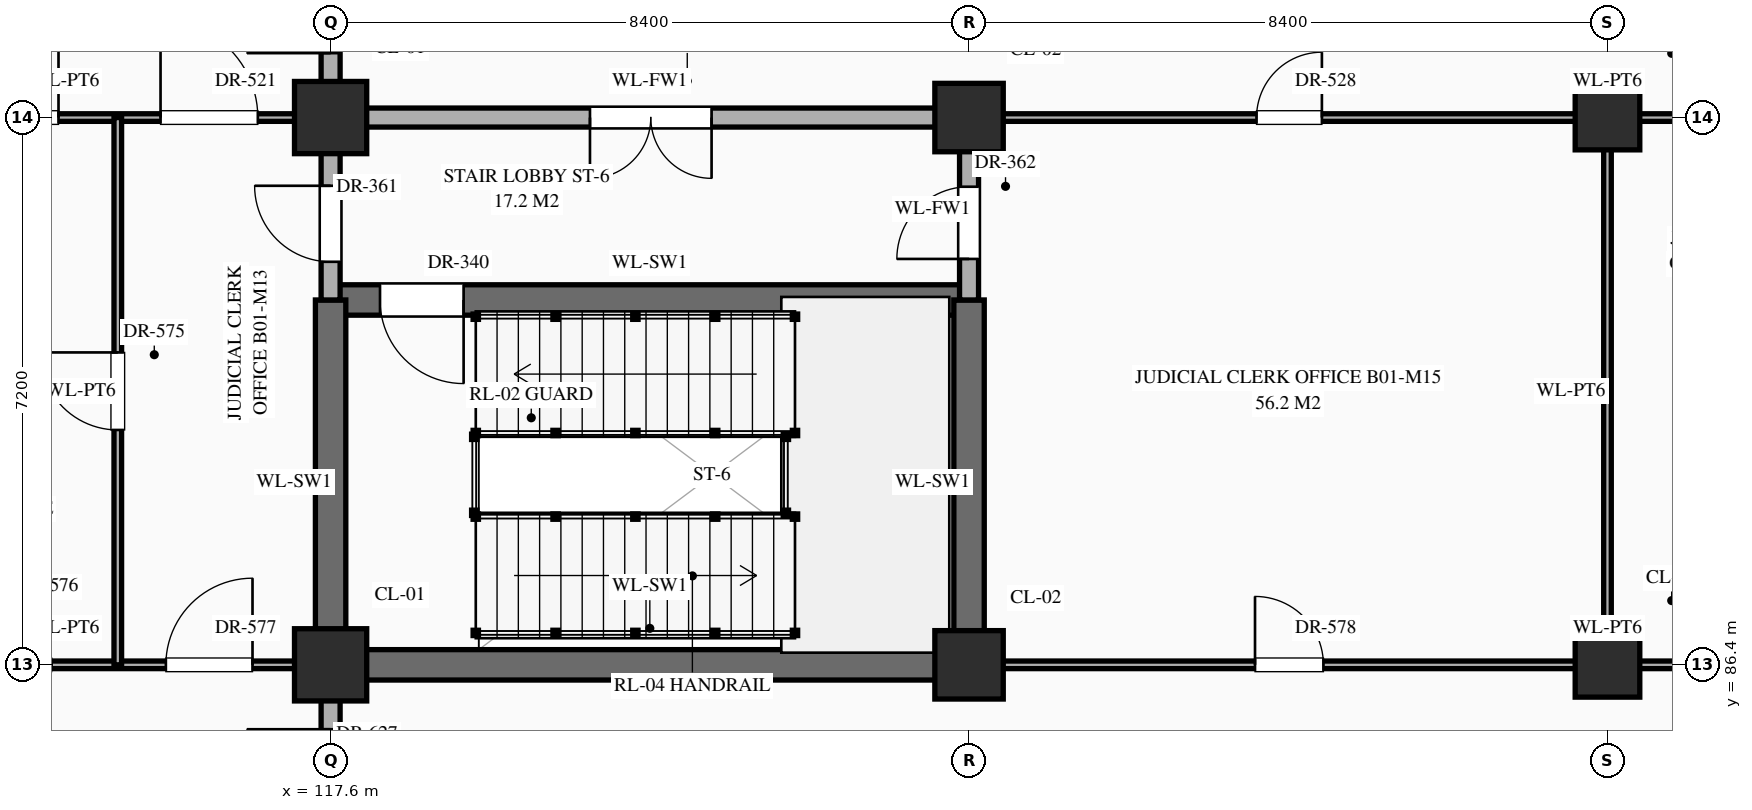
"""IFC4 building model, lengths in metres.
Left out: names, types, materials, properties, quantities, classifications, styles, units other than length and angle.
Written with IfcOpenShell. Run it as: python <this file> out.ifc"""

import sys

from ifc_helpers import new_model, si_unit, direction, frame, frame_2d, origin, origin_2d, place, context, subcontext, project, spatial, rectangle, extrude, element, fill, save


model = new_model("IFC4")
c1 = context("Model", 3, precision=1e-05, world=origin(), true_north=direction((0.0, 1.0)))
c2 = subcontext(c1, "Body", "Model", "MODEL_VIEW")
j1 = project(units=[si_unit("LENGTHUNIT", "METRE"), si_unit("PLANEANGLEUNIT", "RADIAN")], contexts=[c1])
p1 = place(None, origin())
s1 = spatial("IfcSite", under=j1, at=p1, CompositionType="ELEMENT")
p2 = place(p1, origin())
s2 = spatial("IfcBuilding", under=s1, at=p2, CompositionType="ELEMENT")
p3 = place(p2, frame((0.0, 0.0, -5.4)))
s3 = spatial("IfcBuildingStorey", under=s2, at=p3, CompositionType="ELEMENT", Elevation=-5.4)
for number, where, z_axis, x_axis in (
    (1, (117.6, 86.4, 0.0), (0.0, 0.0, 1.0), (1.0, 0.0, 0.0)),
    (2, (117.6, 93.6, 0.0), (0.0, 0.0, 1.0), (1.0, 0.0, 0.0)),
):
    element("IfcColumn", number, at=place(p3, frame(where, z_axis=z_axis, x_axis=x_axis)), inside=s3, PredefinedType="COLUMN", context=c2, shape_type="SweptSolid", body=[
        extrude(rectangle(XDim=0.95, YDim=0.95, at=origin_2d()), origin(), (0.0, 0.0, 1.0), 5.4),
    ])
for number, where, z_axis, x_axis in (
    (3, (126.0, 86.4, 0.0), (0.0, 0.0, 1.0), (1.0, 0.0, 0.0)),
    (4, (126.0, 93.6, 0.0), (0.0, 0.0, 1.0), (1.0, 0.0, 0.0)),
):
    element("IfcColumn", number, at=place(p3, frame(where, z_axis=z_axis, x_axis=x_axis)), inside=s3, PredefinedType="COLUMN", context=c2, shape_type="SweptSolid", body=[
        extrude(rectangle(XDim=0.9, YDim=0.9, at=origin_2d()), origin(), (0.0, 0.0, 1.0), 5.4),
    ])
for number, where, z_axis, x_axis in (
    (5, (134.4, 86.4, 0.0), (0.0, 0.0, 1.0), (1.0, 0.0, 0.0)),
    (6, (134.4, 93.6, 0.0), (0.0, 0.0, 1.0), (1.0, 0.0, 0.0)),
):
    element("IfcColumn", number, at=place(p3, frame(where, z_axis=z_axis, x_axis=x_axis)), inside=s3, PredefinedType="COLUMN", context=c2, shape_type="SweptSolid", body=[
        extrude(rectangle(XDim=0.85, YDim=0.85, at=origin_2d()), origin(), (0.0, 0.0, 1.0), 5.4),
    ])
p4 = place(p3, frame((109.2, 86.4, 0.0), z_axis=(0.0, 0.0, 1.0), x_axis=(1.0, 0.0, 0.0)))
e7 = element("IfcWall", 7, at=p4, inside=s3, PredefinedType="STANDARD", context=c2, shape_type="SweptSolid", body=[
    extrude(rectangle(XDim=8.4, YDim=0.1, at=frame_2d((4.2, 0.0))), origin(), (0.0, 0.0, 1.0), 4.25),
])
p5 = place(p4, frame((1.107, 0.0, 0.0)))
e8 = element("IfcOpeningElement", 8, at=p5, cuts=e7, PredefinedType="OPENING", context=c2, shape_type="SweptSolid", body=[
    extrude(rectangle(XDim=0.98, YDim=2.35, at=frame_2d((0.49, 1.175))), frame((0.0, 0.062, 0.0), z_axis=(0.0, -1.0, 0.0), x_axis=(1.0, 0.0, 0.0)), (0.0, 0.0, 1.0), 0.124),
])
p6 = place(p4, frame((3.67, 0.0, 0.0)))
e9 = element("IfcOpeningElement", 9, at=p6, cuts=e7, PredefinedType="OPENING", context=c2, shape_type="SweptSolid", body=[
    extrude(rectangle(XDim=1.06, YDim=2.4, at=frame_2d((0.53, 1.2))), frame((0.0, 0.062, 0.0), z_axis=(0.0, -1.0, 0.0), x_axis=(1.0, 0.0, 0.0)), (0.0, 0.0, 1.0), 0.124),
])
p7 = place(p4, frame((6.232, 0.0, 0.0)))
e10 = element("IfcOpeningElement", 10, at=p7, cuts=e7, PredefinedType="OPENING", context=c2, shape_type="SweptSolid", body=[
    extrude(rectangle(XDim=1.14, YDim=2.4, at=frame_2d((0.57, 1.2))), frame((0.0, 0.062, 0.0), z_axis=(0.0, -1.0, 0.0), x_axis=(1.0, 0.0, 0.0)), (0.0, 0.0, 1.0), 0.124),
])
p8 = place(p3, frame((117.6, 86.4, 0.0), z_axis=(0.0, 0.0, 1.0), x_axis=(1.0, 0.0, 0.0)))
e11 = element("IfcWall", 11, at=p8, inside=s3, PredefinedType="SHEAR", context=c2, shape_type="SweptSolid", body=[
    extrude(rectangle(XDim=8.4, YDim=0.4, at=frame_2d((4.2, 0.0))), origin(), (0.0, 0.0, 1.0), 5.1),
])
p9 = place(p3, frame((126.0, 86.4, 0.0), z_axis=(0.0, 0.0, 1.0), x_axis=(1.0, 0.0, 0.0)))
e12 = element("IfcWall", 12, at=p9, inside=s3, PredefinedType="STANDARD", context=c2, shape_type="SweptSolid", body=[
    extrude(rectangle(XDim=16.8, YDim=0.1, at=frame_2d((8.4, 0.0))), origin(), (0.0, 0.0, 1.0), 4.25),
])
p10 = place(p9, frame((3.762, 0.0, 0.0)))
e13 = element("IfcOpeningElement", 13, at=p10, cuts=e12, PredefinedType="OPENING", context=c2, shape_type="SweptSolid", body=[
    extrude(rectangle(XDim=0.9, YDim=2.15, at=frame_2d((0.45, 1.075))), frame((0.0, 0.062, 0.0), z_axis=(0.0, -1.0, 0.0), x_axis=(1.0, 0.0, 0.0)), (0.0, 0.0, 1.0), 0.124),
])
p11 = place(p9, frame((9.512, 0.0, 0.0)))
e14 = element("IfcOpeningElement", 14, at=p11, cuts=e12, PredefinedType="OPENING", context=c2, shape_type="SweptSolid", body=[
    extrude(rectangle(XDim=0.92, YDim=2.15, at=frame_2d((0.46, 1.075))), frame((0.0, 0.062, 0.0), z_axis=(0.0, -1.0, 0.0), x_axis=(1.0, 0.0, 0.0)), (0.0, 0.0, 1.0), 0.124),
])
p12 = place(p9, frame((11.7, 0.0, 0.0)))
e15 = element("IfcOpeningElement", 15, at=p12, cuts=e12, PredefinedType="OPENING", context=c2, shape_type="SweptSolid", body=[
    extrude(rectangle(XDim=1.8, YDim=2.5, at=frame_2d((0.9, 1.25))), frame((0.0, 0.062, 0.0), z_axis=(0.0, -1.0, 0.0), x_axis=(1.0, 0.0, 0.0)), (0.0, 0.0, 1.0), 0.124),
])
p13 = place(p9, frame((14.695, 0.0, 0.0)))
e16 = element("IfcOpeningElement", 16, at=p13, cuts=e12, PredefinedType="OPENING", context=c2, shape_type="SweptSolid", body=[
    extrude(rectangle(XDim=1.04, YDim=2.2, at=frame_2d((0.52, 1.1))), frame((0.0, 0.062, 0.0), z_axis=(0.0, -1.0, 0.0), x_axis=(1.0, 0.0, 0.0)), (0.0, 0.0, 1.0), 0.124),
])
p14 = place(p3, frame((117.6, 91.2, 0.0), z_axis=(0.0, 0.0, 1.0), x_axis=(1.0, 0.0, 0.0)))
e17 = element("IfcWall", 17, at=p14, inside=s3, PredefinedType="SHEAR", context=c2, shape_type="SweptSolid", body=[
    extrude(rectangle(XDim=8.4, YDim=0.4, at=frame_2d((4.2, 0.0))), origin(), (0.0, 0.0, 1.0), 5.1),
])
p15 = place(p14, frame((0.65, 0.0, 0.0)))
e18 = element("IfcOpeningElement", 18, at=p15, cuts=e17, PredefinedType="OPENING", context=c2, shape_type="SweptSolid", body=[
    extrude(rectangle(XDim=1.1, YDim=2.2, at=frame_2d((0.55, 1.1))), frame((0.0, 0.212, 0.0), z_axis=(0.0, -1.0, 0.0), x_axis=(1.0, 0.0, 0.0)), (0.0, 0.0, 1.0), 0.424),
])
p16 = place(p3, frame((109.2, 93.6, 0.0), z_axis=(0.0, 0.0, 1.0), x_axis=(1.0, 0.0, 0.0)))
e19 = element("IfcWall", 19, at=p16, inside=s3, PredefinedType="STANDARD", context=c2, shape_type="SweptSolid", body=[
    extrude(rectangle(XDim=8.4, YDim=0.1, at=frame_2d((4.2, 0.0))), origin(), (0.0, 0.0, 1.0), 4.25),
])
p17 = place(p16, frame((0.998, 0.0, 0.0)))
e20 = element("IfcOpeningElement", 20, at=p17, cuts=e19, PredefinedType="OPENING", context=c2, shape_type="SweptSolid", body=[
    extrude(rectangle(XDim=1.2, YDim=2.35, at=frame_2d((0.6, 1.175))), frame((0.0, 0.062, 0.0), z_axis=(0.0, -1.0, 0.0), x_axis=(1.0, 0.0, 0.0)), (0.0, 0.0, 1.0), 0.124),
])
p18 = place(p16, frame((3.58, 0.0, 0.0)))
e21 = element("IfcOpeningElement", 21, at=p18, cuts=e19, PredefinedType="OPENING", context=c2, shape_type="SweptSolid", body=[
    extrude(rectangle(XDim=1.24, YDim=2.3, at=frame_2d((0.62, 1.15))), frame((0.0, 0.062, 0.0), z_axis=(0.0, -1.0, 0.0), x_axis=(1.0, 0.0, 0.0)), (0.0, 0.0, 1.0), 0.124),
])
p19 = place(p16, frame((6.163, 0.0, 0.0)))
e22 = element("IfcOpeningElement", 22, at=p19, cuts=e19, PredefinedType="OPENING", context=c2, shape_type="SweptSolid", body=[
    extrude(rectangle(XDim=1.28, YDim=2.35, at=frame_2d((0.64, 1.175))), frame((0.0, 0.062, 0.0), z_axis=(0.0, -1.0, 0.0), x_axis=(1.0, 0.0, 0.0)), (0.0, 0.0, 1.0), 0.124),
])
p20 = place(p3, frame((117.6, 93.6, 0.0), z_axis=(0.0, 0.0, 1.0), x_axis=(1.0, 0.0, 0.0)))
e23 = element("IfcWall", 23, at=p20, inside=s3, PredefinedType="STANDARD", context=c2, shape_type="SweptSolid", body=[
    extrude(rectangle(XDim=8.4, YDim=0.25, at=frame_2d((4.2, 0.0))), origin(), (0.0, 0.0, 1.0), 4.25),
])
p21 = place(p20, frame((3.413, 0.0, 0.0)))
e24 = element("IfcOpeningElement", 24, at=p21, cuts=e23, PredefinedType="OPENING", context=c2, shape_type="SweptSolid", body=[
    extrude(rectangle(XDim=1.6, YDim=2.3, at=frame_2d((0.8, 1.15))), frame((0.0, 0.137, 0.0), z_axis=(0.0, -1.0, 0.0), x_axis=(1.0, 0.0, 0.0)), (0.0, 0.0, 1.0), 0.274),
])
p22 = place(p3, frame((126.0, 93.6, 0.0), z_axis=(0.0, 0.0, 1.0), x_axis=(1.0, 0.0, 0.0)))
e25 = element("IfcWall", 25, at=p22, inside=s3, PredefinedType="STANDARD", context=c2, shape_type="SweptSolid", body=[
    extrude(rectangle(XDim=16.8, YDim=0.1, at=frame_2d((8.4, 0.0))), origin(), (0.0, 0.0, 1.0), 4.25),
])
p23 = place(p22, frame((3.782, 0.0, 0.0)))
e26 = element("IfcOpeningElement", 26, at=p23, cuts=e25, PredefinedType="OPENING", context=c2, shape_type="SweptSolid", body=[
    extrude(rectangle(XDim=0.86, YDim=2.1, at=frame_2d((0.43, 1.05))), frame((0.0, 0.062, 0.0), z_axis=(0.0, -1.0, 0.0), x_axis=(1.0, 0.0, 0.0)), (0.0, 0.0, 1.0), 0.124),
])
p24 = place(p22, frame((9.512, 0.0, 0.0)))
e27 = element("IfcOpeningElement", 27, at=p24, cuts=e25, PredefinedType="OPENING", context=c2, shape_type="SweptSolid", body=[
    extrude(rectangle(XDim=0.92, YDim=2.15, at=frame_2d((0.46, 1.075))), frame((0.0, 0.062, 0.0), z_axis=(0.0, -1.0, 0.0), x_axis=(1.0, 0.0, 0.0)), (0.0, 0.0, 1.0), 0.124),
])
p25 = place(p22, frame((11.825, 0.0, 0.0)))
e28 = element("IfcOpeningElement", 28, at=p25, cuts=e25, PredefinedType="OPENING", context=c2, shape_type="SweptSolid", body=[
    extrude(rectangle(XDim=1.55, YDim=2.35, at=frame_2d((0.775, 1.175))), frame((0.0, 0.062, 0.0), z_axis=(0.0, -1.0, 0.0), x_axis=(1.0, 0.0, 0.0)), (0.0, 0.0, 1.0), 0.124),
])
p26 = place(p22, frame((14.715, 0.0, 0.0)))
e29 = element("IfcOpeningElement", 29, at=p26, cuts=e25, PredefinedType="OPENING", context=c2, shape_type="SweptSolid", body=[
    extrude(rectangle(XDim=1.0, YDim=2.25, at=frame_2d((0.5, 1.125))), frame((0.0, 0.062, 0.0), z_axis=(0.0, -1.0, 0.0), x_axis=(1.0, 0.0, 0.0)), (0.0, 0.0, 1.0), 0.124),
])
p27 = place(p3, frame((114.8, 86.4, 0.0), z_axis=(0.0, 0.0, 1.0), x_axis=(0.0, 1.0, 0.0)))
e30 = element("IfcWall", 30, at=p27, inside=s3, PredefinedType="STANDARD", context=c2, shape_type="SweptSolid", body=[
    extrude(rectangle(XDim=7.2, YDim=0.1, at=frame_2d((3.6, 0.0))), origin(), (0.0, 0.0, 1.0), 5.1),
])
p28 = place(p27, frame((3.09, 0.0, 0.0)))
e31 = element("IfcOpeningElement", 31, at=p28, cuts=e30, PredefinedType="OPENING", context=c2, shape_type="SweptSolid", body=[
    extrude(rectangle(XDim=1.02, YDim=2.4, at=frame_2d((0.51, 1.2))), frame((0.0, 0.062, 0.0), z_axis=(0.0, -1.0, 0.0), x_axis=(1.0, 0.0, 0.0)), (0.0, 0.0, 1.0), 0.124),
])
p29 = place(p3, frame((117.6, 79.2, 0.0), z_axis=(0.0, 0.0, 1.0), x_axis=(0.0, 1.0, 0.0)))
e32 = element("IfcWall", 32, at=p29, inside=s3, PredefinedType="STANDARD", context=c2, shape_type="SweptSolid", body=[
    extrude(rectangle(XDim=7.2, YDim=0.25, at=frame_2d((3.6, 0.0))), origin(), (0.0, 0.0, 1.0), 4.35),
])
p30 = place(p29, frame((5.252, 0.0, 0.0)))
e33 = element("IfcOpeningElement", 33, at=p30, cuts=e32, PredefinedType="OPENING", context=c2, shape_type="SweptSolid", body=[
    extrude(rectangle(XDim=1.1, YDim=2.2, at=frame_2d((0.55, 1.1))), frame((0.0, 0.137, 0.0), z_axis=(0.0, -1.0, 0.0), x_axis=(1.0, 0.0, 0.0)), (0.0, 0.0, 1.0), 0.274),
])
p31 = place(p3, frame((117.6, 86.4, 0.0), z_axis=(0.0, 0.0, 1.0), x_axis=(0.0, 1.0, 0.0)))
e34 = element("IfcWall", 34, at=p31, inside=s3, PredefinedType="SHEAR", context=c2, shape_type="SweptSolid", body=[
    extrude(rectangle(XDim=4.8, YDim=0.4, at=frame_2d((2.4, 0.0))), origin(), (0.0, 0.0, 1.0), 5.1),
])
p32 = place(p3, frame((117.6, 91.2, 0.0), z_axis=(0.0, 0.0, 1.0), x_axis=(0.0, 1.0, 0.0)))
e35 = element("IfcWall", 35, at=p32, inside=s3, PredefinedType="STANDARD", context=c2, shape_type="SweptSolid", body=[
    extrude(rectangle(XDim=13.2, YDim=0.25, at=frame_2d((6.6, 0.0))), origin(), (0.0, 0.0, 1.0), 4.35),
])
p33 = place(p32, frame((0.502, 0.0, 0.0)))
e36 = element("IfcOpeningElement", 36, at=p33, cuts=e35, PredefinedType="OPENING", context=c2, shape_type="SweptSolid", body=[
    extrude(rectangle(XDim=1.0, YDim=2.2, at=frame_2d((0.5, 1.1))), frame((0.0, 0.137, 0.0), z_axis=(0.0, -1.0, 0.0), x_axis=(1.0, 0.0, 0.0)), (0.0, 0.0, 1.0), 0.274),
])
p34 = place(p32, frame((10.522, 0.0, 0.0)))
e37 = element("IfcOpeningElement", 37, at=p34, cuts=e35, PredefinedType="OPENING", context=c2, shape_type="SweptSolid", body=[
    extrude(rectangle(XDim=0.95, YDim=2.15, at=frame_2d((0.475, 1.075))), frame((0.0, 0.137, 0.0), z_axis=(0.0, -1.0, 0.0), x_axis=(1.0, 0.0, 0.0)), (0.0, 0.0, 1.0), 0.274),
])
p35 = place(p32, frame((3.248, 0.0, 0.0)))
e38 = element("IfcOpeningElement", 38, at=p35, cuts=e35, PredefinedType="OPENING", context=c2, shape_type="SweptSolid", body=[
    extrude(rectangle(XDim=1.1, YDim=2.2, at=frame_2d((0.55, 1.1))), frame((0.0, 0.137, 0.0), z_axis=(0.0, -1.0, 0.0), x_axis=(1.0, 0.0, 0.0)), (0.0, 0.0, 1.0), 0.274),
])
p36 = place(p3, frame((126.0, 86.4, 0.0), z_axis=(0.0, 0.0, 1.0), x_axis=(0.0, 1.0, 0.0)))
e39 = element("IfcWall", 39, at=p36, inside=s3, PredefinedType="SHEAR", context=c2, shape_type="SweptSolid", body=[
    extrude(rectangle(XDim=4.8, YDim=0.4, at=frame_2d((2.4, 0.0))), origin(), (0.0, 0.0, 1.0), 5.1),
])
p37 = place(p3, frame((126.0, 91.2, 0.0), z_axis=(0.0, 0.0, 1.0), x_axis=(0.0, 1.0, 0.0)))
e40 = element("IfcWall", 40, at=p37, inside=s3, PredefinedType="STANDARD", context=c2, shape_type="SweptSolid", body=[
    extrude(rectangle(XDim=2.4, YDim=0.25, at=frame_2d((1.2, 0.0))), origin(), (0.0, 0.0, 1.0), 4.35),
])
p38 = place(p37, frame((0.54, 0.0, 0.0)))
e41 = element("IfcOpeningElement", 41, at=p38, cuts=e40, PredefinedType="OPENING", context=c2, shape_type="SweptSolid", body=[
    extrude(rectangle(XDim=0.95, YDim=2.15, at=frame_2d((0.475, 1.075))), frame((0.0, 0.137, 0.0), z_axis=(0.0, -1.0, 0.0), x_axis=(1.0, 0.0, 0.0)), (0.0, 0.0, 1.0), 0.274),
])
p39 = place(p3, frame((134.4, 86.4, 0.0), z_axis=(0.0, 0.0, 1.0), x_axis=(0.0, 1.0, 0.0)))
e42 = element("IfcWall", 42, at=p39, inside=s3, PredefinedType="STANDARD", context=c2, shape_type="SweptSolid", body=[
    extrude(rectangle(XDim=7.2, YDim=0.1, at=frame_2d((3.6, 0.0))), origin(), (0.0, 0.0, 1.0), 4.35),
])
p40 = place(p15, frame((1.1, 0.0, 0.0), z_axis=(0.0, 0.0, 1.0), x_axis=(-1.0, 0.0, 0.0)))
e43 = element("IfcDoor", 43, at=p40, inside=s3, OperationType="SINGLE_SWING_LEFT", PredefinedType="DOOR", context=c2, shape_type="SweptSolid", body=[
    extrude(rectangle(XDim=1.1, YDim=2.2, at=frame_2d((0.55, 1.1))), frame((0.0, 0.025, 0.0), z_axis=(0.0, -1.0, 0.0), x_axis=(1.0, 0.0, 0.0)), (0.0, 0.0, 1.0), 0.05),
])
fill(e18, e43)
p41 = place(p21, frame((1.6, 0.0, 0.0), z_axis=(0.0, 0.0, 1.0), x_axis=(-1.0, 0.0, 0.0)))
e44 = element("IfcDoor", 44, at=p41, inside=s3, OperationType="DOUBLE_DOOR_SINGLE_SWING", PredefinedType="DOOR", context=c2, shape_type="SweptSolid", body=[
    extrude(rectangle(XDim=1.6, YDim=2.3, at=frame_2d((0.8, 1.15))), frame((0.0, 0.025, 0.0), z_axis=(0.0, -1.0, 0.0), x_axis=(1.0, 0.0, 0.0)), (0.0, 0.0, 1.0), 0.05),
])
fill(e24, e44)
p42 = place(p33, origin())
e45 = element("IfcDoor", 45, at=p42, inside=s3, OperationType="SINGLE_SWING_RIGHT", PredefinedType="DOOR", context=c2, shape_type="SweptSolid", body=[
    extrude(rectangle(XDim=1.0, YDim=2.2, at=frame_2d((0.5, 1.1))), frame((0.0, 0.025, 0.0), z_axis=(0.0, -1.0, 0.0), x_axis=(1.0, 0.0, 0.0)), (0.0, 0.0, 1.0), 0.05),
])
fill(e36, e45)
p43 = place(p38, origin())
e46 = element("IfcDoor", 46, at=p43, inside=s3, OperationType="SINGLE_SWING_LEFT", PredefinedType="DOOR", context=c2, shape_type="SweptSolid", body=[
    extrude(rectangle(XDim=0.95, YDim=2.15, at=frame_2d((0.475, 1.075))), frame((0.0, 0.025, 0.0), z_axis=(0.0, -1.0, 0.0), x_axis=(1.0, 0.0, 0.0)), (0.0, 0.0, 1.0), 0.05),
])
fill(e41, e46)
p44 = place(p35, origin())
e47 = element("IfcDoor", 47, at=p44, inside=s3, OperationType="SINGLE_SWING_LEFT", PredefinedType="DOOR", context=c2, shape_type="SweptSolid", body=[
    extrude(rectangle(XDim=1.1, YDim=2.2, at=frame_2d((0.55, 1.1))), frame((0.0, 0.025, 0.0), z_axis=(0.0, -1.0, 0.0), x_axis=(1.0, 0.0, 0.0)), (0.0, 0.0, 1.0), 0.05),
])
fill(e38, e47)
p45 = place(p18, origin())
e48 = element("IfcDoor", 48, at=p45, inside=s3, OperationType="SINGLE_SWING_RIGHT", PredefinedType="DOOR", context=c2, shape_type="SweptSolid", body=[
    extrude(rectangle(XDim=1.24, YDim=2.3, at=frame_2d((0.62, 1.15))), frame((0.0, 0.025, 0.0), z_axis=(0.0, -1.0, 0.0), x_axis=(1.0, 0.0, 0.0)), (0.0, 0.0, 1.0), 0.05),
])
fill(e21, e48)
p46 = place(p19, origin())
e49 = element("IfcDoor", 49, at=p46, inside=s3, OperationType="SINGLE_SWING_LEFT", PredefinedType="DOOR", context=c2, shape_type="SweptSolid", body=[
    extrude(rectangle(XDim=1.28, YDim=2.35, at=frame_2d((0.64, 1.175))), frame((0.0, 0.025, 0.0), z_axis=(0.0, -1.0, 0.0), x_axis=(1.0, 0.0, 0.0)), (0.0, 0.0, 1.0), 0.05),
])
fill(e22, e49)
p47 = place(p23, origin())
e50 = element("IfcDoor", 50, at=p47, inside=s3, OperationType="SINGLE_SWING_RIGHT", PredefinedType="DOOR", context=c2, shape_type="SweptSolid", body=[
    extrude(rectangle(XDim=0.86, YDim=2.1, at=frame_2d((0.43, 1.05))), frame((0.0, 0.025, 0.0), z_axis=(0.0, -1.0, 0.0), x_axis=(1.0, 0.0, 0.0)), (0.0, 0.0, 1.0), 0.05),
])
fill(e26, e50)
p48 = place(p28, origin())
e51 = element("IfcDoor", 51, at=p48, inside=s3, OperationType="SINGLE_SWING_RIGHT", PredefinedType="DOOR", context=c2, shape_type="SweptSolid", body=[
    extrude(rectangle(XDim=1.02, YDim=2.4, at=frame_2d((0.51, 1.2))), frame((0.0, 0.025, 0.0), z_axis=(0.0, -1.0, 0.0), x_axis=(1.0, 0.0, 0.0)), (0.0, 0.0, 1.0), 0.05),
])
fill(e31, e51)
p49 = place(p7, origin())
e52 = element("IfcDoor", 52, at=p49, inside=s3, OperationType="SINGLE_SWING_RIGHT", PredefinedType="DOOR", context=c2, shape_type="SweptSolid", body=[
    extrude(rectangle(XDim=1.14, YDim=2.4, at=frame_2d((0.57, 1.2))), frame((0.0, 0.025, 0.0), z_axis=(0.0, -1.0, 0.0), x_axis=(1.0, 0.0, 0.0)), (0.0, 0.0, 1.0), 0.05),
])
fill(e10, e52)
p50 = place(p10, origin())
e53 = element("IfcDoor", 53, at=p50, inside=s3, OperationType="SINGLE_SWING_LEFT", PredefinedType="DOOR", context=c2, shape_type="SweptSolid", body=[
    extrude(rectangle(XDim=0.9, YDim=2.15, at=frame_2d((0.45, 1.075))), frame((0.0, 0.025, 0.0), z_axis=(0.0, -1.0, 0.0), x_axis=(1.0, 0.0, 0.0)), (0.0, 0.0, 1.0), 0.05),
])
fill(e13, e53)
p51 = place(p30, origin())
e54 = element("IfcDoor", 54, at=p51, inside=s3, OperationType="SINGLE_SWING_RIGHT", PredefinedType="DOOR", context=c2, shape_type="SweptSolid", body=[
    extrude(rectangle(XDim=1.1, YDim=2.2, at=frame_2d((0.55, 1.1))), frame((0.0, 0.025, 0.0), z_axis=(0.0, -1.0, 0.0), x_axis=(1.0, 0.0, 0.0)), (0.0, 0.0, 1.0), 0.05),
])
fill(e33, e54)
save(model, sys.argv[1])
